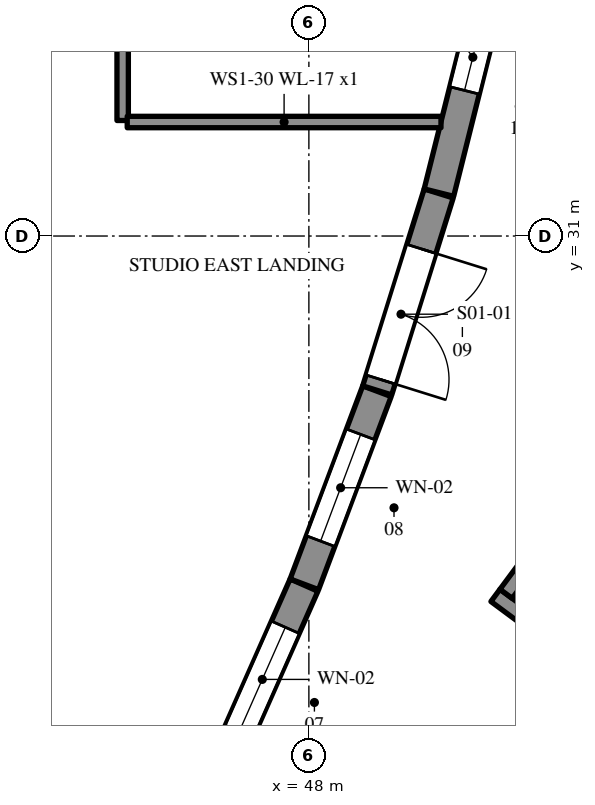
"""IFC4 building model, lengths in metres.
Left out: names, types, materials, properties, quantities, classifications, styles, units other than length and angle.
Written with IfcOpenShell. Run it as: python <this file> out.ifc"""

import sys

from ifc_helpers import new_model, si_unit, direction, frame, frame_2d, origin, place, context, subcontext, project, spatial, rectangle, extrude, element, fill, save


model = new_model("IFC4")
c1 = context("Model", 3, precision=1e-05, world=origin(), true_north=direction((0.0, 1.0)))
c2 = subcontext(c1, "Body", "Model", "MODEL_VIEW")
j1 = project(units=[si_unit("LENGTHUNIT", "METRE"), si_unit("PLANEANGLEUNIT", "RADIAN")], contexts=[c1])
p1 = place(None, origin())
s1 = spatial("IfcSite", under=j1, at=p1, CompositionType="ELEMENT")
p2 = place(p1, origin())
s2 = spatial("IfcBuilding", under=s1, at=p2, CompositionType="ELEMENT")
p3 = place(p2, frame((0.0, 0.0, 5.4)))
s3 = spatial("IfcBuildingStorey", under=s2, at=p3, CompositionType="ELEMENT", Elevation=5.4)
p4 = place(p3, frame((46.838, 23.925, 0.0), z_axis=(0.0, 0.0, 1.0), x_axis=(0.404652153757, 0.914470685402, 0.0)))
e1 = element("IfcWall", 1, at=p4, inside=s3, PredefinedType="SOLIDWALL", context=c2, shape_type="SweptSolid", body=[
    extrude(rectangle(XDim=2.714, YDim=0.4, at=frame_2d((1.357, 0.0))), origin(), (0.0, 0.0, 1.0), 4.5),
])
p5 = place(p4, frame((0.607, 0.0, 0.3)))
e2 = element("IfcOpeningElement", 2, at=p5, cuts=e1, PredefinedType="OPENING", context=c2, shape_type="SweptSolid", body=[
    extrude(rectangle(XDim=1.5, YDim=2.7, at=frame_2d((0.75, 1.35))), frame((0.0, 0.21, 0.0), z_axis=(0.0, -1.0, 0.0), x_axis=(1.0, 0.0, 0.0)), (0.0, 0.0, 1.0), 0.42),
])
p6 = place(p3, frame((47.94, 26.417, 0.0), z_axis=(0.0, 0.0, 1.0), x_axis=(0.351862601417, 0.936051659752, 0.0)))
e3 = element("IfcWall", 3, at=p6, inside=s3, PredefinedType="SOLIDWALL", context=c2, shape_type="SweptSolid", body=[
    extrude(rectangle(XDim=2.714, YDim=0.4, at=frame_2d((1.357, 0.0))), origin(), (0.0, 0.0, 1.0), 4.5),
])
p7 = place(p6, frame((0.607, 0.0, 0.3)))
e4 = element("IfcOpeningElement", 4, at=p7, cuts=e3, PredefinedType="OPENING", context=c2, shape_type="SweptSolid", body=[
    extrude(rectangle(XDim=1.5, YDim=2.7, at=frame_2d((0.75, 1.35))), frame((0.0, 0.21, 0.0), z_axis=(0.0, -1.0, 0.0), x_axis=(1.0, 0.0, 0.0)), (0.0, 0.0, 1.0), 0.42),
])
p8 = place(p3, frame((48.899, 28.969, 0.0), z_axis=(0.0, 0.0, 1.0), x_axis=(0.29795748067, 0.954579142718, 0.0)))
e5 = element("IfcWall", 5, at=p8, inside=s3, PredefinedType="SOLIDWALL", context=c2, shape_type="SweptSolid", body=[
    extrude(rectangle(XDim=2.715, YDim=0.4, at=frame_2d((1.357, 0.0))), origin(), (0.0, 0.0, 1.0), 4.5),
])
p9 = place(p8, frame((0.15, 0.0, 0.0)))
e6 = element("IfcOpeningElement", 6, at=p9, cuts=e5, PredefinedType="OPENING", context=c2, shape_type="SweptSolid", body=[
    extrude(rectangle(XDim=1.8, YDim=2.1, at=frame_2d((0.9, 1.05))), frame((0.0, 0.21, 0.0), z_axis=(0.0, -1.0, 0.0), x_axis=(1.0, 0.0, 0.0)), (0.0, 0.0, 1.0), 0.42),
])
p10 = place(p3, frame((49.711, 31.571, 0.0), z_axis=(0.0, 0.0, 1.0), x_axis=(0.2430011368, 0.970026003525, 0.0)))
e7 = element("IfcWall", 7, at=p10, inside=s3, PredefinedType="SOLIDWALL", context=c2, shape_type="SweptSolid", body=[
    extrude(rectangle(XDim=2.715, YDim=0.4, at=frame_2d((1.357, 0.0))), origin(), (0.0, 0.0, 1.0), 4.5),
])
p11 = place(p10, frame((1.386, 0.0, 0.9)))
e8 = element("IfcOpeningElement", 8, at=p11, cuts=e7, PredefinedType="OPENING", context=c2, shape_type="SweptSolid", body=[
    extrude(rectangle(XDim=0.9, YDim=2.1, at=frame_2d((0.45, 1.05))), frame((0.0, 0.21, 0.0), z_axis=(0.0, -1.0, 0.0), x_axis=(1.0, 0.0, 0.0)), (0.0, 0.0, 1.0), 0.42),
])
p12 = place(p3, frame((45.55, 41.48, 0.0), z_axis=(0.0, 0.0, 1.0), x_axis=(0.0, -1.0, 0.0)))
e9 = element("IfcWall", 9, at=p12, inside=s3, PredefinedType="PARTITIONING", context=c2, shape_type="SweptSolid", body=[
    extrude(rectangle(XDim=8.96, YDim=0.15, at=frame_2d((4.48, 0.0))), origin(), (0.0, 0.0, 1.0), 4.5),
])
p13 = place(p12, frame((4.03, 0.0, 0.0)))
e10 = element("IfcOpeningElement", 10, at=p13, cuts=e9, PredefinedType="OPENING", context=c2, shape_type="SweptSolid", body=[
    extrude(rectangle(XDim=0.9, YDim=2.1, at=frame_2d((0.45, 1.05))), frame((0.0, 0.085, 0.0), z_axis=(0.0, -1.0, 0.0), x_axis=(1.0, 0.0, 0.0)), (0.0, 0.0, 1.0), 0.17),
])
p14 = place(p3, frame((45.61, 32.5, 0.0), z_axis=(0.0, 0.0, 1.0), x_axis=(1.0, 0.0, 0.0)))
e11 = element("IfcWall", 11, at=p14, inside=s3, PredefinedType="PARTITIONING", context=c2, shape_type="SweptSolid", body=[
    extrude(rectangle(XDim=4.128, YDim=0.15, at=frame_2d((2.064, 0.0))), origin(), (0.0, 0.0, 1.0), 4.5),
])
p15 = place(p3, frame((53.787, 23.799, 0.0), z_axis=(0.0, 0.0, 1.0), x_axis=(-0.803074417046, 0.595878746631, 0.0)))
e12 = element("IfcWall", 12, at=p15, inside=s3, PredefinedType="SHEAR", context=c2, shape_type="SweptSolid", body=[
    extrude(rectangle(XDim=4.15, YDim=0.2, at=frame_2d((2.075, 0.0))), origin(), (0.0, 0.0, 1.0), 4.519),
])
p16 = place(p15, frame((1.525, 0.0, 0.0)))
e13 = element("IfcOpeningElement", 13, at=p16, cuts=e12, PredefinedType="OPENING", context=c2, shape_type="SweptSolid", body=[
    extrude(rectangle(XDim=1.1, YDim=2.1, at=frame_2d((0.55, 1.05))), frame((0.0, 0.11, 0.0), z_axis=(0.0, -1.0, 0.0), x_axis=(1.0, 0.0, 0.0)), (0.0, 0.0, 1.0), 0.22),
])
p17 = place(p3, frame((50.594, 26.292, 0.0), z_axis=(0.0, 0.0, 1.0), x_axis=(0.595865972218, 0.803083895463, 0.0)))
e14 = element("IfcWall", 14, at=p17, inside=s3, PredefinedType="SHEAR", context=c2, shape_type="SweptSolid", body=[
    extrude(rectangle(XDim=8.0, YDim=0.2, at=frame_2d((4.0, 0.0))), origin(), (0.0, 0.0, 1.0), 4.519),
])
p18 = place(p9, frame((1.8, 0.0, 0.0), z_axis=(0.0, 0.0, 1.0), x_axis=(-1.0, 0.0, 0.0)))
e15 = element("IfcDoor", 15, at=p18, inside=s3, OperationType="DOUBLE_DOOR_SINGLE_SWING", PredefinedType="DOOR", context=c2, shape_type="SweptSolid", body=[
    extrude(rectangle(XDim=1.8, YDim=2.1, at=frame_2d((0.9, 1.05))), frame((0.0, 0.025, 0.0), z_axis=(0.0, -1.0, 0.0), x_axis=(1.0, 0.0, 0.0)), (0.0, 0.0, 1.0), 0.05),
])
fill(e6, e15)
p19 = place(p5, origin())
e16 = element("IfcWindow", 16, at=p19, inside=s3, PartitioningType="SINGLE_PANEL", PredefinedType="WINDOW", context=c2, shape_type="SweptSolid", body=[
    extrude(rectangle(XDim=1.5, YDim=2.7, at=frame_2d((0.75, 1.35))), frame((0.0, 0.03, 0.0), z_axis=(0.0, -1.0, 0.0), x_axis=(1.0, 0.0, 0.0)), (0.0, 0.0, 1.0), 0.06),
])
fill(e2, e16)
p20 = place(p7, origin())
e17 = element("IfcWindow", 17, at=p20, inside=s3, PartitioningType="SINGLE_PANEL", PredefinedType="WINDOW", context=c2, shape_type="SweptSolid", body=[
    extrude(rectangle(XDim=1.5, YDim=2.7, at=frame_2d((0.75, 1.35))), frame((0.0, 0.03, 0.0), z_axis=(0.0, -1.0, 0.0), x_axis=(1.0, 0.0, 0.0)), (0.0, 0.0, 1.0), 0.06),
])
fill(e4, e17)
p21 = place(p11, origin())
e18 = element("IfcWindow", 18, at=p21, inside=s3, PartitioningType="SINGLE_PANEL", PredefinedType="WINDOW", context=c2, shape_type="SweptSolid", body=[
    extrude(rectangle(XDim=0.9, YDim=2.1, at=frame_2d((0.45, 1.05))), frame((0.0, 0.03, 0.0), z_axis=(0.0, -1.0, 0.0), x_axis=(1.0, 0.0, 0.0)), (0.0, 0.0, 1.0), 0.06),
])
fill(e8, e18)
save(model, sys.argv[1])
